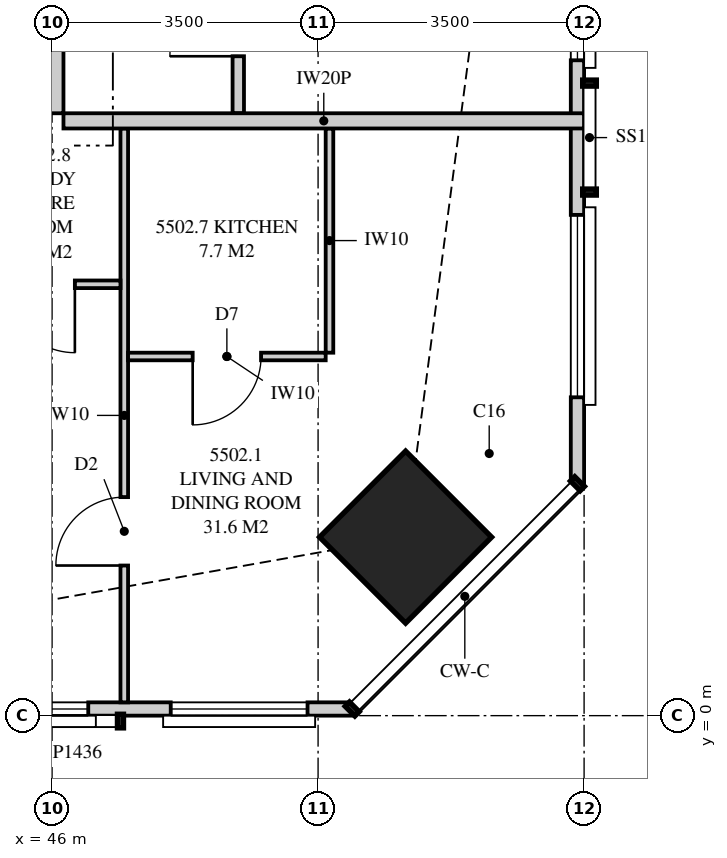
"""IFC4 building model, lengths in metres.
Left out: names, types, materials, properties, quantities, classifications, styles, units other than length and angle.
Written with IfcOpenShell. Run it as: python <this file> out.ifc"""

import sys

from ifc_helpers import new_model, si_unit, direction, frame, frame_2d, origin, origin_2d, place, context, subcontext, project, spatial, polyline, rectangle, outline, extrude, element, fill, save


model = new_model("IFC4")
c1 = context("Model", 3, precision=1e-05, world=origin(), true_north=direction((0.0, 1.0)))
c2 = subcontext(c1, "Body", "Model", "MODEL_VIEW")
j1 = project(units=[si_unit("LENGTHUNIT", "METRE"), si_unit("PLANEANGLEUNIT", "RADIAN")], contexts=[c1])
p1 = place(None, origin())
s1 = spatial("IfcSite", under=j1, at=p1, CompositionType="ELEMENT")
p2 = place(p1, origin())
s2 = spatial("IfcBuilding", under=s1, at=p2, CompositionType="ELEMENT")
p3 = place(p2, frame((0.0, 0.0, 201.25)))
s3 = spatial("IfcBuildingStorey", under=s2, at=p3, CompositionType="ELEMENT", Elevation=201.25)
p4 = place(p3, frame((50.652, 2.348, 0.0), z_axis=(0.0, 0.0, 1.0), x_axis=(0.707106781187, 0.707106781187, 0.0)))
e1 = element("IfcColumn", 1, at=p4, inside=s3, PredefinedType="COLUMN", context=c2, shape_type="SweptSolid", body=[
    extrude(rectangle(XDim=1.6, YDim=1.6, at=origin_2d()), origin(), (0.0, 0.0, 1.0), 3.35),
])
p5 = place(p3, frame((15.051, 0.087, 0.0), z_axis=(0.0, 0.0, 1.0), x_axis=(1.0, 0.0, 0.0)))
e2 = element("IfcWall", 2, at=p5, inside=s3, PredefinedType="SOLIDWALL", context=c2, shape_type="SweptSolid", body=[
    extrude(outline(polyline([(0.0, 0.0), (34.897, 0.0), (34.897, 3.11), (27.91, 3.11), (27.91, 2.15), (27.836, 2.15), (27.836, 3.11), (27.699, 3.11), (27.699, 2.15), (7.199, 2.15), (7.199, 3.11), (7.062, 3.11), (7.062, 2.15), (6.987, 2.15), (6.987, 3.11), (0.0, 3.11), (0.0, 0.0)])), frame((0.0, 0.087, 0.0), z_axis=(0.0, -1.0, 0.0), x_axis=(1.0, 0.0, 0.0)), (0.0, 0.0, 1.0), 0.175),
])
p6 = place(p5, frame((0.699, 0.0, 0.4)))
e3 = element("IfcOpeningElement", 3, at=p6, cuts=e2, PredefinedType="OPENING", context=c2, shape_type="SweptSolid", body=[
    extrude(rectangle(XDim=1.8, YDim=1.7, at=frame_2d((0.9, 0.85))), frame((0.0, 0.097, 0.0), z_axis=(0.0, -1.0, 0.0), x_axis=(1.0, 0.0, 0.0)), (0.0, 0.0, 1.0), 0.195),
])
p7 = place(p5, frame((9.274, 0.0, 0.4)))
e4 = element("IfcOpeningElement", 4, at=p7, cuts=e2, PredefinedType="OPENING", context=c2, shape_type="SweptSolid", body=[
    extrude(rectangle(XDim=2.4, YDim=1.7, at=frame_2d((1.2, 0.85))), frame((0.0, 0.097, 0.0), z_axis=(0.0, -1.0, 0.0), x_axis=(1.0, 0.0, 0.0)), (0.0, 0.0, 1.0), 0.195),
])
p8 = place(p5, frame((13.561, 0.0, 0.0)))
e5 = element("IfcOpeningElement", 5, at=p8, cuts=e2, PredefinedType="OPENING", context=c2, shape_type="SweptSolid", body=[
    extrude(rectangle(XDim=1.8, YDim=2.1, at=frame_2d((0.9, 1.05))), frame((0.0, 0.097, 0.0), z_axis=(0.0, -1.0, 0.0), x_axis=(1.0, 0.0, 0.0)), (0.0, 0.0, 1.0), 0.195),
])
p9 = place(p5, frame((20.049, 0.0, 0.4)))
e6 = element("IfcOpeningElement", 6, at=p9, cuts=e2, PredefinedType="OPENING", context=c2, shape_type="SweptSolid", body=[
    extrude(rectangle(XDim=1.8, YDim=1.7, at=frame_2d((0.9, 0.85))), frame((0.0, 0.097, 0.0), z_axis=(0.0, -1.0, 0.0), x_axis=(1.0, 0.0, 0.0)), (0.0, 0.0, 1.0), 0.195),
])
p10 = place(p5, frame((23.649, 0.0, 0.4)))
e7 = element("IfcOpeningElement", 7, at=p10, cuts=e2, PredefinedType="OPENING", context=c2, shape_type="SweptSolid", body=[
    extrude(rectangle(XDim=1.8, YDim=1.7, at=frame_2d((0.9, 0.85))), frame((0.0, 0.097, 0.0), z_axis=(0.0, -1.0, 0.0), x_axis=(1.0, 0.0, 0.0)), (0.0, 0.0, 1.0), 0.195),
])
p11 = place(p5, frame((29.625, 0.0, 0.4)))
e8 = element("IfcOpeningElement", 8, at=p11, cuts=e2, PredefinedType="OPENING", context=c2, shape_type="SweptSolid", body=[
    extrude(rectangle(XDim=1.8, YDim=1.7, at=frame_2d((0.9, 0.85))), frame((0.0, 0.097, 0.0), z_axis=(0.0, -1.0, 0.0), x_axis=(1.0, 0.0, 0.0)), (0.0, 0.0, 1.0), 0.195),
])
p12 = place(p5, frame((32.51, 0.0, 0.4)))
e9 = element("IfcOpeningElement", 9, at=p12, cuts=e2, PredefinedType="OPENING", context=c2, shape_type="SweptSolid", body=[
    extrude(rectangle(XDim=1.8, YDim=1.7, at=frame_2d((0.9, 0.85))), frame((0.0, 0.097, 0.0), z_axis=(0.0, -1.0, 0.0), x_axis=(1.0, 0.0, 0.0)), (0.0, 0.0, 1.0), 0.195),
])
p13 = place(p3, frame((52.913, 3.051, 0.0), z_axis=(0.0, 0.0, 1.0), x_axis=(0.0, 1.0, 0.0)))
e10 = element("IfcWall", 10, at=p13, inside=s3, PredefinedType="SOLIDWALL", context=c2, shape_type="SweptSolid", body=[
    extrude(outline(polyline([(0.0, 0.0), (29.897, 0.0), (29.897, 3.11), (22.167, 3.11), (22.167, 2.15), (22.074, 2.15), (22.074, 3.11), (21.949, 3.11), (21.949, 2.15), (9.949, 2.15), (9.949, 3.11), (9.847, 3.11), (9.847, 2.15), (9.706, 2.15), (9.706, 3.11), (0.0, 3.11), (0.0, 0.0)])), frame((0.0, 0.087, 0.0), z_axis=(0.0, -1.0, 0.0), x_axis=(1.0, 0.0, 0.0)), (0.0, 0.0, 1.0), 0.175),
])
p14 = place(p13, frame((1.137, 0.0, 0.4)))
e11 = element("IfcOpeningElement", 11, at=p14, cuts=e10, PredefinedType="OPENING", context=c2, shape_type="SweptSolid", body=[
    extrude(rectangle(XDim=2.4, YDim=1.7, at=frame_2d((1.2, 0.85))), frame((0.0, 0.097, 0.0), z_axis=(0.0, -1.0, 0.0), x_axis=(1.0, 0.0, 0.0)), (0.0, 0.0, 1.0), 0.195),
])
p15 = place(p13, frame((5.571, 0.0, 0.4)))
e12 = element("IfcOpeningElement", 12, at=p15, cuts=e10, PredefinedType="OPENING", context=c2, shape_type="SweptSolid", body=[
    extrude(rectangle(XDim=2.4, YDim=1.7, at=frame_2d((1.2, 0.85))), frame((0.0, 0.097, 0.0), z_axis=(0.0, -1.0, 0.0), x_axis=(1.0, 0.0, 0.0)), (0.0, 0.0, 1.0), 0.195),
])
p16 = place(p13, frame((11.879, 0.0, 0.4)))
e13 = element("IfcOpeningElement", 13, at=p16, cuts=e10, PredefinedType="OPENING", context=c2, shape_type="SweptSolid", body=[
    extrude(rectangle(XDim=1.8, YDim=1.7, at=frame_2d((0.9, 0.85))), frame((0.0, 0.097, 0.0), z_axis=(0.0, -1.0, 0.0), x_axis=(1.0, 0.0, 0.0)), (0.0, 0.0, 1.0), 0.195),
])
p17 = place(p13, frame((15.324, 0.0, 0.0)))
e14 = element("IfcOpeningElement", 14, at=p17, cuts=e10, PredefinedType="OPENING", context=c2, shape_type="SweptSolid", body=[
    extrude(rectangle(XDim=1.8, YDim=2.1, at=frame_2d((0.9, 1.05))), frame((0.0, 0.097, 0.0), z_axis=(0.0, -1.0, 0.0), x_axis=(1.0, 0.0, 0.0)), (0.0, 0.0, 1.0), 0.195),
])
p18 = place(p13, frame((18.224, 0.0, 0.4)))
e15 = element("IfcOpeningElement", 15, at=p18, cuts=e10, PredefinedType="OPENING", context=c2, shape_type="SweptSolid", body=[
    extrude(rectangle(XDim=1.8, YDim=1.7, at=frame_2d((0.9, 0.85))), frame((0.0, 0.097, 0.0), z_axis=(0.0, -1.0, 0.0), x_axis=(1.0, 0.0, 0.0)), (0.0, 0.0, 1.0), 0.195),
])
p19 = place(p13, frame((27.461, 0.0, 0.4)))
e16 = element("IfcOpeningElement", 16, at=p19, cuts=e10, PredefinedType="OPENING", context=c2, shape_type="SweptSolid", body=[
    extrude(rectangle(XDim=1.2, YDim=1.7, at=frame_2d((0.6, 0.85))), frame((0.0, 0.097, 0.0), z_axis=(0.0, -1.0, 0.0), x_axis=(1.0, 0.0, 0.0)), (0.0, 0.0, 1.0), 0.195),
])
p20 = place(p3, frame((46.95, 0.175, 0.0), z_axis=(0.0, 0.0, 1.0), x_axis=(0.0, 1.0, 0.0)))
e17 = element("IfcWall", 17, at=p20, inside=s3, PredefinedType="PARTITIONING", context=c2, shape_type="SweptSolid", body=[
    extrude(outline(polyline([(0.0, 0.0), (7.55, 0.0), (7.55, 3.11), (2.392, 3.11), (2.392, 2.15), (0.645, 2.15), (0.645, 3.11), (0.0, 3.11), (0.0, 0.0)])), frame((0.0, 0.05, 0.0), z_axis=(0.0, -1.0, 0.0), x_axis=(1.0, 0.0, 0.0)), (0.0, 0.0, 1.0), 0.1),
])
p21 = place(p20, frame((1.8, 0.0, 0.0)))
e18 = element("IfcOpeningElement", 18, at=p21, cuts=e17, PredefinedType="OPENING", context=c2, shape_type="SweptSolid", body=[
    extrude(rectangle(XDim=0.9, YDim=2.1, at=frame_2d((0.45, 1.05))), frame((0.0, 0.06, 0.0), z_axis=(0.0, -1.0, 0.0), x_axis=(1.0, 0.0, 0.0)), (0.0, 0.0, 1.0), 0.12),
])
p22 = place(p3, frame((47.0, 4.725, 0.0), z_axis=(0.0, 0.0, 1.0), x_axis=(1.0, 0.0, 0.0)))
e19 = element("IfcWall", 19, at=p22, inside=s3, PredefinedType="PARTITIONING", context=c2, shape_type="SweptSolid", body=[
    extrude(rectangle(XDim=2.6, YDim=0.1, at=frame_2d((1.3, 0.0))), origin(), (0.0, 0.0, 1.0), 3.11),
])
p23 = place(p22, frame((0.85, 0.0, 0.0)))
e20 = element("IfcOpeningElement", 20, at=p23, cuts=e19, PredefinedType="OPENING", context=c2, shape_type="SweptSolid", body=[
    extrude(rectangle(XDim=0.9, YDim=2.1, at=frame_2d((0.45, 1.05))), frame((0.0, 0.06, 0.0), z_axis=(0.0, -1.0, 0.0), x_axis=(1.0, 0.0, 0.0)), (0.0, 0.0, 1.0), 0.12),
])
p24 = place(p3, frame((49.65, 4.775, 0.0), z_axis=(0.0, 0.0, 1.0), x_axis=(0.0, 1.0, 0.0)))
e21 = element("IfcWall", 21, at=p24, inside=s3, PredefinedType="PARTITIONING", context=c2, shape_type="SweptSolid", body=[
    extrude(rectangle(XDim=2.95, YDim=0.1, at=frame_2d((1.475, 0.0))), origin(), (0.0, 0.0, 1.0), 3.11),
])
p25 = place(p3, frame((46.15, 7.825, 0.0), z_axis=(0.0, 0.0, 1.0), x_axis=(1.0, 0.0, 0.0)))
e22 = element("IfcWall", 22, at=p25, inside=s3, PredefinedType="PARTITIONING", context=c2, shape_type="SweptSolid", body=[
    extrude(outline(polyline([(0.0, 0.0), (6.85, 0.0), (6.85, 3.11), (6.138, 3.11), (6.138, 2.15), (4.303, 2.15), (4.303, 3.11), (0.0, 3.11), (0.0, 0.0)])), frame((0.0, 0.1, 0.0), z_axis=(0.0, -1.0, 0.0), x_axis=(1.0, 0.0, 0.0)), (0.0, 0.0, 1.0), 0.2),
])
p26 = place(p3, frame((46.05, 7.925, 0.0), z_axis=(0.0, 0.0, 1.0), x_axis=(0.0, 1.0, 0.0)))
e23 = element("IfcWall", 23, at=p26, inside=s3, PredefinedType="PARTITIONING", context=c2, shape_type="SweptSolid", body=[
    extrude(outline(polyline([(0.0, 0.0), (5.875, 0.0), (5.875, 3.11), (5.412, 3.11), (5.412, 2.541), (4.738, 2.541), (4.738, 3.11), (0.0, 3.11), (0.0, 0.0)])), frame((0.0, 0.1, 0.0), z_axis=(0.0, -1.0, 0.0), x_axis=(1.0, 0.0, 0.0)), (0.0, 0.0, 1.0), 0.2),
])
p27 = place(p26, frame((2.438, 0.0, 0.0)))
e24 = element("IfcOpeningElement", 24, at=p27, cuts=e23, PredefinedType="OPENING", context=c2, shape_type="SweptSolid", body=[
    extrude(rectangle(XDim=1.05, YDim=2.2, at=frame_2d((0.525, 1.1))), frame((0.0, 0.11, 0.0), z_axis=(0.0, -1.0, 0.0), x_axis=(1.0, 0.0, 0.0)), (0.0, 0.0, 1.0), 0.22),
])
p28 = place(p3, frame((48.45, 7.925, 0.0), z_axis=(0.0, 0.0, 1.0), x_axis=(0.0, 1.0, 0.0)))
e25 = element("IfcWall", 25, at=p28, inside=s3, PredefinedType="PLUMBINGWALL", context=c2, shape_type="SweptSolid", body=[
    extrude(rectangle(XDim=2.425, YDim=0.15, at=frame_2d((1.212, 0.0))), origin(), (0.0, 0.0, 1.0), 3.11),
])
p29 = place(p28, frame((0.75, 0.0, 0.0)))
e26 = element("IfcOpeningElement", 26, at=p29, cuts=e25, PredefinedType="OPENING", context=c2, shape_type="SweptSolid", body=[
    extrude(rectangle(XDim=0.9, YDim=2.1, at=frame_2d((0.45, 1.05))), frame((0.0, 0.085, 0.0), z_axis=(0.0, -1.0, 0.0), x_axis=(1.0, 0.0, 0.0)), (0.0, 0.0, 1.0), 0.17),
])
p30 = place(p3, frame((46.9, 5.675, 0.0), z_axis=(0.0, 0.0, 1.0), x_axis=(-1.0, 0.0, 0.0)))
e27 = element("IfcWall", 27, at=p30, inside=s3, PredefinedType="PARTITIONING", context=c2, shape_type="SweptSolid", body=[
    extrude(rectangle(XDim=2.1, YDim=0.1, at=frame_2d((1.05, 0.0))), origin(), (0.0, 0.0, 1.0), 3.11),
])
p31 = place(p30, frame((0.6, 0.0, 0.0)))
e28 = element("IfcOpeningElement", 28, at=p31, cuts=e27, PredefinedType="OPENING", context=c2, shape_type="SweptSolid", body=[
    extrude(rectangle(XDim=0.9, YDim=2.1, at=frame_2d((0.45, 1.05))), frame((0.0, 0.06, 0.0), z_axis=(0.0, -1.0, 0.0), x_axis=(1.0, 0.0, 0.0)), (0.0, 0.0, 1.0), 0.12),
])
p32 = place(p11, origin())
e29 = element("IfcWindow", 29, at=p32, inside=s3, PartitioningType="SINGLE_PANEL", PredefinedType="WINDOW", context=c2, shape_type="SweptSolid", body=[
    extrude(rectangle(XDim=1.8, YDim=1.7, at=frame_2d((0.9, 0.85))), frame((0.0, 0.03, 0.0), z_axis=(0.0, -1.0, 0.0), x_axis=(1.0, 0.0, 0.0)), (0.0, 0.0, 1.0), 0.06),
])
fill(e8, e29)
p33 = place(p12, origin())
e30 = element("IfcWindow", 30, at=p33, inside=s3, PartitioningType="SINGLE_PANEL", PredefinedType="WINDOW", context=c2, shape_type="SweptSolid", body=[
    extrude(rectangle(XDim=1.8, YDim=1.7, at=frame_2d((0.9, 0.85))), frame((0.0, 0.03, 0.0), z_axis=(0.0, -1.0, 0.0), x_axis=(1.0, 0.0, 0.0)), (0.0, 0.0, 1.0), 0.06),
])
fill(e9, e30)
p34 = place(p14, origin())
e31 = element("IfcWindow", 31, at=p34, inside=s3, PartitioningType="SINGLE_PANEL", PredefinedType="WINDOW", context=c2, shape_type="SweptSolid", body=[
    extrude(rectangle(XDim=2.4, YDim=1.7, at=frame_2d((1.2, 0.85))), frame((0.0, 0.03, 0.0), z_axis=(0.0, -1.0, 0.0), x_axis=(1.0, 0.0, 0.0)), (0.0, 0.0, 1.0), 0.06),
])
fill(e11, e31)
p35 = place(p15, origin())
e32 = element("IfcWindow", 32, at=p35, inside=s3, PartitioningType="SINGLE_PANEL", PredefinedType="WINDOW", context=c2, shape_type="SweptSolid", body=[
    extrude(rectangle(XDim=2.4, YDim=1.7, at=frame_2d((1.2, 0.85))), frame((0.0, 0.03, 0.0), z_axis=(0.0, -1.0, 0.0), x_axis=(1.0, 0.0, 0.0)), (0.0, 0.0, 1.0), 0.06),
])
fill(e12, e32)
p36 = place(p21, origin())
e33 = element("IfcDoor", 33, at=p36, inside=s3, OperationType="SINGLE_SWING_LEFT", PredefinedType="DOOR", context=c2, shape_type="SweptSolid", body=[
    extrude(rectangle(XDim=0.9, YDim=2.1, at=frame_2d((0.45, 1.05))), frame((0.0, 0.025, 0.0), z_axis=(0.0, -1.0, 0.0), x_axis=(1.0, 0.0, 0.0)), (0.0, 0.0, 1.0), 0.05),
])
fill(e18, e33)
p37 = place(p23, frame((0.9, 0.0, 0.0), z_axis=(0.0, 0.0, 1.0), x_axis=(-1.0, 0.0, 0.0)))
e34 = element("IfcDoor", 34, at=p37, inside=s3, OperationType="SINGLE_SWING_RIGHT", PredefinedType="DOOR", context=c2, shape_type="SweptSolid", body=[
    extrude(rectangle(XDim=0.9, YDim=2.1, at=frame_2d((0.45, 1.05))), frame((0.0, 0.025, 0.0), z_axis=(0.0, -1.0, 0.0), x_axis=(1.0, 0.0, 0.0)), (0.0, 0.0, 1.0), 0.05),
])
fill(e20, e34)
p38 = place(p29, origin())
e35 = element("IfcDoor", 35, at=p38, inside=s3, OperationType="SINGLE_SWING_LEFT", PredefinedType="DOOR", context=c2, shape_type="SweptSolid", body=[
    extrude(rectangle(XDim=0.9, YDim=2.1, at=frame_2d((0.45, 1.05))), frame((0.0, 0.025, 0.0), z_axis=(0.0, -1.0, 0.0), x_axis=(1.0, 0.0, 0.0)), (0.0, 0.0, 1.0), 0.05),
])
fill(e26, e35)
p39 = place(p31, origin())
e36 = element("IfcDoor", 36, at=p39, inside=s3, OperationType="SINGLE_SWING_LEFT", PredefinedType="DOOR", context=c2, shape_type="SweptSolid", body=[
    extrude(rectangle(XDim=0.9, YDim=2.1, at=frame_2d((0.45, 1.05))), frame((0.0, 0.025, 0.0), z_axis=(0.0, -1.0, 0.0), x_axis=(1.0, 0.0, 0.0)), (0.0, 0.0, 1.0), 0.05),
])
fill(e28, e36)
save(model, sys.argv[1])
